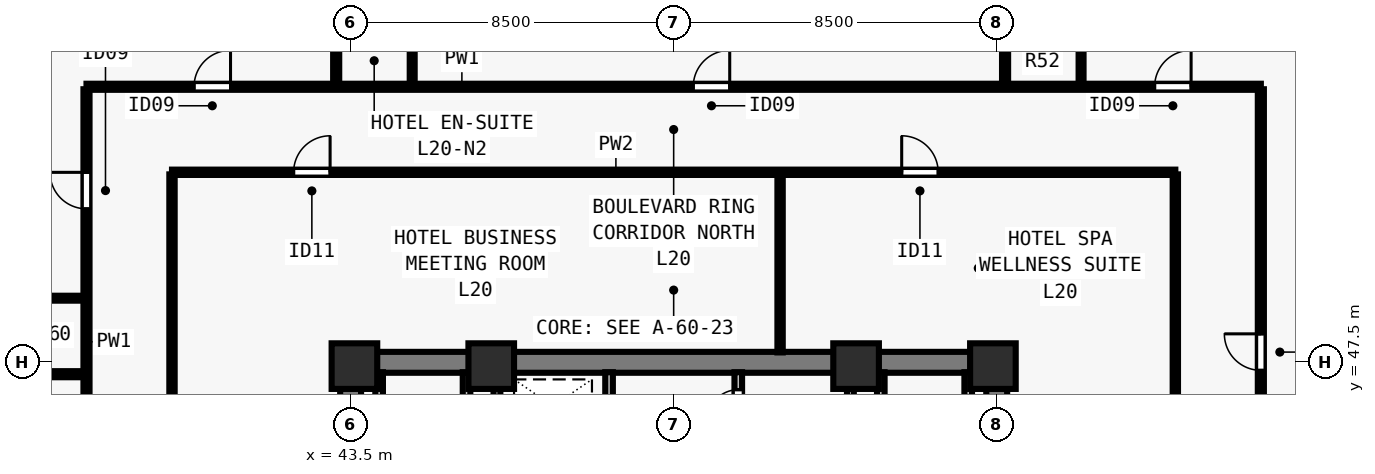
"""IFC4 building model, lengths in metres.
Left out: names, types, materials, properties, quantities, classifications, styles, units other than length and angle.
Written with IfcOpenShell. Run it as: python <this file> out.ifc"""

import sys

from ifc_helpers import new_model, si_unit, direction, frame, frame_2d, origin, origin_2d, place, context, subcontext, project, spatial, rectangle, extrude, element, fill, save


model = new_model("IFC4")
c1 = context("Model", 3, precision=1e-05, world=origin(), true_north=direction((0.0, 1.0)))
c2 = subcontext(c1, "Body", "Model", "MODEL_VIEW")
j1 = project(units=[si_unit("LENGTHUNIT", "METRE"), si_unit("PLANEANGLEUNIT", "RADIAN")], contexts=[c1])
p1 = place(None, origin())
s1 = spatial("IfcSite", under=j1, at=p1, CompositionType="ELEMENT")
p2 = place(p1, origin())
s2 = spatial("IfcBuilding", under=s1, at=p2, CompositionType="ELEMENT")
p3 = place(p2, frame((0.0, 0.0, 76.0)))
s3 = spatial("IfcBuildingStorey", under=s2, at=p3, CompositionType="ELEMENT", Elevation=76.0)
for number, where, z_axis, x_axis in (
    (1, (43.6, 47.4, 0.0), (0.0, 0.0, 1.0), (1.0, 0.0, 0.0)),
    (2, (47.2, 47.4, 0.0), (0.0, 0.0, 1.0), (1.0, 0.0, 0.0)),
    (3, (56.8, 47.4, 0.0), (0.0, 0.0, 1.0), (1.0, 0.0, 0.0)),
    (4, (60.4, 47.4, 0.0), (0.0, 0.0, 1.0), (1.0, 0.0, 0.0)),
):
    element("IfcColumn", number, at=place(p3, frame(where, z_axis=z_axis, x_axis=x_axis)), inside=s3, PredefinedType="COLUMN", context=c2, shape_type="SweptSolid", body=[
        extrude(rectangle(XDim=1.2, YDim=1.2, at=origin_2d()), origin(), (0.0, 0.0, 1.0), 3.5),
    ])
p4 = place(p3, frame((43.225, 47.5, 0.0), z_axis=(0.0, 0.0, 1.0), x_axis=(1.0, 0.0, 0.0)))
e5 = element("IfcWall", 5, at=p4, inside=s3, PredefinedType="SHEAR", context=c2, shape_type="SweptSolid", body=[
    extrude(rectangle(XDim=17.55, YDim=0.55, at=frame_2d((8.775, 0.0))), origin(), (0.0, 0.0, 1.0), 3.28),
])
for number, where, z_axis, x_axis in (
    (6, (43.5, 40.8, 0.0), (0.0, 0.0, 1.0), (0.0, 1.0, 0.0)),
    (7, (60.5, 40.8, 0.0), (0.0, 0.0, 1.0), (0.0, 1.0, 0.0)),
):
    element("IfcWall", number, at=place(p3, frame(where, z_axis=z_axis, x_axis=x_axis)), inside=s3, PredefinedType="SHEAR", context=c2, shape_type="SweptSolid", body=[
        extrude(rectangle(XDim=6.435, YDim=0.55, at=frame_2d((3.218, 0.0))), origin(), (0.0, 0.0, 1.0), 3.28),
    ])
p5 = place(p3, frame((50.3, 40.585, 0.0), z_axis=(0.0, 0.0, 1.0), x_axis=(0.0, 1.0, 0.0)))
e8 = element("IfcWall", 8, at=p5, inside=s3, PredefinedType="SOLIDWALL", context=c2, shape_type="SweptSolid", body=[
    extrude(rectangle(XDim=6.655, YDim=0.2, at=frame_2d((3.328, 0.0))), origin(), (0.0, 0.0, 1.0), 3.28),
])
p6 = place(p5, frame((5.065, 0.0, 0.0)))
e9 = element("IfcOpeningElement", 9, at=p6, cuts=e8, PredefinedType="OPENING", context=c2, shape_type="SweptSolid", body=[
    extrude(rectangle(XDim=0.8, YDim=2.08, at=frame_2d((0.4, 1.04))), frame((0.0, 0.11, 0.0), z_axis=(0.0, -1.0, 0.0), x_axis=(1.0, 0.0, 0.0)), (0.0, 0.0, 1.0), 0.22),
])
p7 = place(p3, frame((53.7, 40.585, 0.0), z_axis=(0.0, 0.0, 1.0), x_axis=(0.0, 1.0, 0.0)))
e10 = element("IfcWall", 10, at=p7, inside=s3, PredefinedType="SOLIDWALL", context=c2, shape_type="SweptSolid", body=[
    extrude(rectangle(XDim=6.655, YDim=0.2, at=frame_2d((3.328, 0.0))), origin(), (0.0, 0.0, 1.0), 3.28),
])
p8 = place(p7, frame((0.195, 0.0, 0.0)))
e11 = element("IfcOpeningElement", 11, at=p8, cuts=e10, PredefinedType="OPENING", context=c2, shape_type="SweptSolid", body=[
    extrude(rectangle(XDim=0.8, YDim=2.08, at=frame_2d((0.4, 1.04))), frame((0.0, 0.11, 0.0), z_axis=(0.0, -1.0, 0.0), x_axis=(1.0, 0.0, 0.0)), (0.0, 0.0, 1.0), 0.22),
])
p9 = place(p7, frame((3.735, 0.0, 0.0)))
e12 = element("IfcOpeningElement", 12, at=p9, cuts=e10, PredefinedType="OPENING", context=c2, shape_type="SweptSolid", body=[
    extrude(rectangle(XDim=0.9, YDim=2.12, at=frame_2d((0.45, 1.06))), frame((0.0, 0.11, 0.0), z_axis=(0.0, -1.0, 0.0), x_axis=(1.0, 0.0, 0.0)), (0.0, 0.0, 1.0), 0.22),
])
p10 = place(p7, frame((5.395, 0.0, 0.0)))
e13 = element("IfcOpeningElement", 13, at=p10, cuts=e10, PredefinedType="OPENING", context=c2, shape_type="SweptSolid", body=[
    extrude(rectangle(XDim=0.8, YDim=2.1, at=frame_2d((0.4, 1.05))), frame((0.0, 0.11, 0.0), z_axis=(0.0, -1.0, 0.0), x_axis=(1.0, 0.0, 0.0)), (0.0, 0.0, 1.0), 0.22),
])
for number, where, z_axis, x_axis in (
    (14, (46.55, 43.735, 0.0), (0.0, 0.0, 1.0), (0.0, 1.0, 0.0)),
    (15, (44.25, 43.735, 0.0), (0.0, 0.0, 1.0), (0.0, 1.0, 0.0)),
    (16, (57.45, 43.735, 0.0), (0.0, 0.0, 1.0), (0.0, 1.0, 0.0)),
    (17, (59.75, 43.735, 0.0), (0.0, 0.0, 1.0), (0.0, 1.0, 0.0)),
):
    element("IfcWall", number, at=place(p3, frame(where, z_axis=z_axis, x_axis=x_axis)), inside=s3, PredefinedType="SOLIDWALL", context=c2, shape_type="SweptSolid", body=[
        extrude(rectangle(XDim=3.505, YDim=0.2, at=frame_2d((1.752, 0.0))), origin(), (0.0, 0.0, 1.0), 3.28),
    ])
for number, where, z_axis, x_axis in (
    (18, (47.35, 43.735, 0.0), (0.0, 0.0, 1.0), (0.0, 1.0, 0.0)),
    (19, (56.65, 43.735, 0.0), (0.0, 0.0, 1.0), (0.0, 1.0, 0.0)),
):
    element("IfcWall", number, at=place(p3, frame(where, z_axis=z_axis, x_axis=x_axis)), inside=s3, PredefinedType="SOLIDWALL", context=c2, shape_type="SweptSolid", body=[
        extrude(rectangle(XDim=3.505, YDim=0.18, at=frame_2d((1.752, 0.0))), origin(), (0.0, 0.0, 1.0), 3.28),
    ])
p11 = place(p3, frame((36.55, 54.75, 0.0), z_axis=(0.0, 0.0, 1.0), x_axis=(1.0, 0.0, 0.0)))
e20 = element("IfcWall", 20, at=p11, inside=s3, PredefinedType="PARTITIONING", context=c2, shape_type="SweptSolid", body=[
    extrude(rectangle(XDim=30.9, YDim=0.16, at=frame_2d((15.45, 0.0))), origin(), (0.0, 0.0, 1.0), 3.28),
])
p12 = place(p11, frame((2.83, 0.0, 0.0)))
e21 = element("IfcOpeningElement", 21, at=p12, cuts=e20, PredefinedType="OPENING", context=c2, shape_type="SweptSolid", body=[
    extrude(rectangle(XDim=0.96, YDim=2.15, at=frame_2d((0.48, 1.075))), frame((0.0, 0.09, 0.0), z_axis=(0.0, -1.0, 0.0), x_axis=(1.0, 0.0, 0.0)), (0.0, 0.0, 1.0), 0.18),
])
p13 = place(p11, frame((15.965, 0.0, 0.0)))
e22 = element("IfcOpeningElement", 22, at=p13, cuts=e20, PredefinedType="OPENING", context=c2, shape_type="SweptSolid", body=[
    extrude(rectangle(XDim=0.96, YDim=2.15, at=frame_2d((0.48, 1.075))), frame((0.0, 0.09, 0.0), z_axis=(0.0, -1.0, 0.0), x_axis=(1.0, 0.0, 0.0)), (0.0, 0.0, 1.0), 0.18),
])
p14 = place(p11, frame((28.105, 0.0, 0.0)))
e23 = element("IfcOpeningElement", 23, at=p14, cuts=e20, PredefinedType="OPENING", context=c2, shape_type="SweptSolid", body=[
    extrude(rectangle(XDim=0.96, YDim=2.15, at=frame_2d((0.48, 1.075))), frame((0.0, 0.09, 0.0), z_axis=(0.0, -1.0, 0.0), x_axis=(1.0, 0.0, 0.0)), (0.0, 0.0, 1.0), 0.18),
])
p15 = place(p3, frame((36.55, 23.315, 0.0), z_axis=(0.0, 0.0, 1.0), x_axis=(0.0, 1.0, 0.0)))
e24 = element("IfcWall", 24, at=p15, inside=s3, PredefinedType="PARTITIONING", context=c2, shape_type="SweptSolid", body=[
    extrude(rectangle(XDim=31.37, YDim=0.16, at=frame_2d((15.685, 0.0))), origin(), (0.0, 0.0, 1.0), 3.28),
])
p16 = place(p15, frame((4.848, 0.0, 0.0)))
e25 = element("IfcOpeningElement", 25, at=p16, cuts=e24, PredefinedType="OPENING", context=c2, shape_type="SweptSolid", body=[
    extrude(rectangle(XDim=0.96, YDim=2.15, at=frame_2d((0.48, 1.075))), frame((0.0, 0.09, 0.0), z_axis=(0.0, -1.0, 0.0), x_axis=(1.0, 0.0, 0.0)), (0.0, 0.0, 1.0), 0.18),
])
p17 = place(p15, frame((12.39, 0.0, 0.0)))
e26 = element("IfcOpeningElement", 26, at=p17, cuts=e24, PredefinedType="OPENING", context=c2, shape_type="SweptSolid", body=[
    extrude(rectangle(XDim=0.96, YDim=2.15, at=frame_2d((0.48, 1.075))), frame((0.0, 0.09, 0.0), z_axis=(0.0, -1.0, 0.0), x_axis=(1.0, 0.0, 0.0)), (0.0, 0.0, 1.0), 0.18),
])
p18 = place(p15, frame((20.265, 0.0, 0.0)))
e27 = element("IfcOpeningElement", 27, at=p18, cuts=e24, PredefinedType="OPENING", context=c2, shape_type="SweptSolid", body=[
    extrude(rectangle(XDim=0.96, YDim=2.15, at=frame_2d((0.48, 1.075))), frame((0.0, 0.09, 0.0), z_axis=(0.0, -1.0, 0.0), x_axis=(1.0, 0.0, 0.0)), (0.0, 0.0, 1.0), 0.18),
])
p19 = place(p15, frame((28.223, 0.0, 0.0)))
e28 = element("IfcOpeningElement", 28, at=p19, cuts=e24, PredefinedType="OPENING", context=c2, shape_type="SweptSolid", body=[
    extrude(rectangle(XDim=0.96, YDim=2.15, at=frame_2d((0.48, 1.075))), frame((0.0, 0.09, 0.0), z_axis=(0.0, -1.0, 0.0), x_axis=(1.0, 0.0, 0.0)), (0.0, 0.0, 1.0), 0.18),
])
p20 = place(p3, frame((67.45, 23.315, 0.0), z_axis=(0.0, 0.0, 1.0), x_axis=(0.0, 1.0, 0.0)))
e29 = element("IfcWall", 29, at=p20, inside=s3, PredefinedType="PARTITIONING", context=c2, shape_type="SweptSolid", body=[
    extrude(rectangle(XDim=31.37, YDim=0.16, at=frame_2d((15.685, 0.0))), origin(), (0.0, 0.0, 1.0), 3.28),
])
p21 = place(p20, frame((8.474, 0.0, 0.0)))
e30 = element("IfcOpeningElement", 30, at=p21, cuts=e29, PredefinedType="OPENING", context=c2, shape_type="SweptSolid", body=[
    extrude(rectangle(XDim=0.96, YDim=2.15, at=frame_2d((0.48, 1.075))), frame((0.0, 0.09, 0.0), z_axis=(0.0, -1.0, 0.0), x_axis=(1.0, 0.0, 0.0)), (0.0, 0.0, 1.0), 0.18),
])
p22 = place(p20, frame((23.974, 0.0, 0.0)))
e31 = element("IfcOpeningElement", 31, at=p22, cuts=e29, PredefinedType="OPENING", context=c2, shape_type="SweptSolid", body=[
    extrude(rectangle(XDim=0.96, YDim=2.15, at=frame_2d((0.48, 1.075))), frame((0.0, 0.09, 0.0), z_axis=(0.0, -1.0, 0.0), x_axis=(1.0, 0.0, 0.0)), (0.0, 0.0, 1.0), 0.18),
])
p23 = place(p3, frame((38.8, 52.5, 0.0), z_axis=(0.0, 0.0, 1.0), x_axis=(1.0, 0.0, 0.0)))
e32 = element("IfcWall", 32, at=p23, inside=s3, PredefinedType="PARTITIONING", context=c2, shape_type="SweptSolid", body=[
    extrude(rectangle(XDim=26.4, YDim=0.14, at=frame_2d((13.2, 0.0))), origin(), (0.0, 0.0, 1.0), 3.28),
])
p24 = place(p23, frame((3.2, 0.0, 0.0)))
e33 = element("IfcOpeningElement", 33, at=p24, cuts=e32, PredefinedType="OPENING", context=c2, shape_type="SweptSolid", body=[
    extrude(rectangle(XDim=0.96, YDim=2.12, at=frame_2d((0.48, 1.06))), frame((0.0, 0.08, 0.0), z_axis=(0.0, -1.0, 0.0), x_axis=(1.0, 0.0, 0.0)), (0.0, 0.0, 1.0), 0.16),
])
p25 = place(p23, frame((19.2, 0.0, 0.0)))
e34 = element("IfcOpeningElement", 34, at=p25, cuts=e32, PredefinedType="OPENING", context=c2, shape_type="SweptSolid", body=[
    extrude(rectangle(XDim=0.96, YDim=2.12, at=frame_2d((0.48, 1.06))), frame((0.0, 0.08, 0.0), z_axis=(0.0, -1.0, 0.0), x_axis=(1.0, 0.0, 0.0)), (0.0, 0.0, 1.0), 0.16),
])
p26 = place(p3, frame((38.8, 40.8, 0.0), z_axis=(0.0, 0.0, 1.0), x_axis=(0.0, 1.0, 0.0)))
e35 = element("IfcWall", 35, at=p26, inside=s3, PredefinedType="PARTITIONING", context=c2, shape_type="SweptSolid", body=[
    extrude(rectangle(XDim=11.645, YDim=0.14, at=frame_2d((5.823, 0.0))), origin(), (0.0, 0.0, 1.0), 3.28),
])
p27 = place(p26, frame((2.5, 0.0, 0.0)))
e36 = element("IfcOpeningElement", 36, at=p27, cuts=e35, PredefinedType="OPENING", context=c2, shape_type="SweptSolid", body=[
    extrude(rectangle(XDim=0.88, YDim=2.1, at=frame_2d((0.44, 1.05))), frame((0.0, 0.08, 0.0), z_axis=(0.0, -1.0, 0.0), x_axis=(1.0, 0.0, 0.0)), (0.0, 0.0, 1.0), 0.16),
])
p28 = place(p3, frame((65.2, 40.8, 0.0), z_axis=(0.0, 0.0, 1.0), x_axis=(0.0, 1.0, 0.0)))
e37 = element("IfcWall", 37, at=p28, inside=s3, PredefinedType="PARTITIONING", context=c2, shape_type="SweptSolid", body=[
    extrude(rectangle(XDim=11.645, YDim=0.14, at=frame_2d((5.823, 0.0))), origin(), (0.0, 0.0, 1.0), 3.28),
])
p29 = place(p28, frame((2.5, 0.0, 0.0)))
e38 = element("IfcOpeningElement", 38, at=p29, cuts=e37, PredefinedType="OPENING", context=c2, shape_type="SweptSolid", body=[
    extrude(rectangle(XDim=0.88, YDim=2.1, at=frame_2d((0.44, 1.05))), frame((0.0, 0.08, 0.0), z_axis=(0.0, -1.0, 0.0), x_axis=(1.0, 0.0, 0.0)), (0.0, 0.0, 1.0), 0.16),
])
p30 = place(p3, frame((54.8, 47.76, 0.0), z_axis=(0.0, 0.0, 1.0), x_axis=(0.0, 1.0, 0.0)))
e39 = element("IfcWall", 39, at=p30, inside=s3, PredefinedType="PARTITIONING", context=c2, shape_type="SweptSolid", body=[
    extrude(rectangle(XDim=4.685, YDim=0.14, at=frame_2d((2.343, 0.0))), origin(), (0.0, 0.0, 1.0), 3.28),
])
p31 = place(p3, frame((43.12, 54.815, 0.0), z_axis=(0.0, 0.0, 1.0), x_axis=(0.0, 1.0, 0.0)))
e40 = element("IfcWall", 40, at=p31, inside=s3, PredefinedType="PARTITIONING", context=c2, shape_type="SweptSolid", body=[
    extrude(rectangle(XDim=9.34, YDim=0.16, at=frame_2d((4.67, 0.0))), origin(), (0.0, 0.0, 1.0), 3.28),
])
p32 = place(p3, frame((45.12, 54.815, 0.0), z_axis=(0.0, 0.0, 1.0), x_axis=(0.0, 1.0, 0.0)))
e41 = element("IfcWall", 41, at=p32, inside=s3, PredefinedType="PLUMBINGWALL", context=c2, shape_type="SweptSolid", body=[
    extrude(rectangle(XDim=2.235, YDim=0.13, at=frame_2d((1.118, 0.0))), origin(), (0.0, 0.0, 1.0), 3.28),
])
p33 = place(p3, frame((60.72, 54.815, 0.0), z_axis=(0.0, 0.0, 1.0), x_axis=(0.0, 1.0, 0.0)))
e42 = element("IfcWall", 42, at=p33, inside=s3, PredefinedType="PARTITIONING", context=c2, shape_type="SweptSolid", body=[
    extrude(rectangle(XDim=9.34, YDim=0.16, at=frame_2d((4.67, 0.0))), origin(), (0.0, 0.0, 1.0), 3.28),
])
p34 = place(p3, frame((62.72, 54.815, 0.0), z_axis=(0.0, 0.0, 1.0), x_axis=(0.0, 1.0, 0.0)))
e43 = element("IfcWall", 43, at=p34, inside=s3, PredefinedType="PLUMBINGWALL", context=c2, shape_type="SweptSolid", body=[
    extrude(rectangle(XDim=2.235, YDim=0.13, at=frame_2d((1.118, 0.0))), origin(), (0.0, 0.0, 1.0), 3.28),
])
p35 = place(p3, frame((26.845, 47.187, 0.0), z_axis=(0.0, 0.0, 1.0), x_axis=(1.0, 0.0, 0.0)))
e44 = element("IfcWall", 44, at=p35, inside=s3, PredefinedType="PARTITIONING", context=c2, shape_type="SweptSolid", body=[
    extrude(rectangle(XDim=9.64, YDim=0.16, at=frame_2d((4.82, 0.0))), origin(), (0.0, 0.0, 1.0), 3.28),
])
p36 = place(p3, frame((34.25, 49.187, 0.0), z_axis=(0.0, 0.0, 1.0), x_axis=(1.0, 0.0, 0.0)))
e45 = element("IfcWall", 45, at=p36, inside=s3, PredefinedType="PLUMBINGWALL", context=c2, shape_type="SweptSolid", body=[
    extrude(rectangle(XDim=2.235, YDim=0.13, at=frame_2d((1.118, 0.0))), origin(), (0.0, 0.0, 1.0), 3.28),
])
p37 = place(p10, origin())
e46 = element("IfcDoor", 46, at=p37, inside=s3, OperationType="SINGLE_SWING_LEFT", PredefinedType="DOOR", context=c2, shape_type="SweptSolid", body=[
    extrude(rectangle(XDim=0.8, YDim=2.1, at=frame_2d((0.4, 1.05))), frame((0.0, 0.025, 0.0), z_axis=(0.0, -1.0, 0.0), x_axis=(1.0, 0.0, 0.0)), (0.0, 0.0, 1.0), 0.05),
])
fill(e13, e46)
p38 = place(p24, origin())
e47 = element("IfcDoor", 47, at=p38, inside=s3, OperationType="SINGLE_SWING_RIGHT", PredefinedType="DOOR", context=c2, shape_type="SweptSolid", body=[
    extrude(rectangle(XDim=0.96, YDim=2.12, at=frame_2d((0.48, 1.06))), frame((0.0, 0.025, 0.0), z_axis=(0.0, -1.0, 0.0), x_axis=(1.0, 0.0, 0.0)), (0.0, 0.0, 1.0), 0.05),
])
fill(e33, e47)
p39 = place(p25, origin())
e48 = element("IfcDoor", 48, at=p39, inside=s3, OperationType="SINGLE_SWING_LEFT", PredefinedType="DOOR", context=c2, shape_type="SweptSolid", body=[
    extrude(rectangle(XDim=0.96, YDim=2.12, at=frame_2d((0.48, 1.06))), frame((0.0, 0.025, 0.0), z_axis=(0.0, -1.0, 0.0), x_axis=(1.0, 0.0, 0.0)), (0.0, 0.0, 1.0), 0.05),
])
fill(e34, e48)
p40 = place(p12, origin())
e49 = element("IfcDoor", 49, at=p40, inside=s3, OperationType="SINGLE_SWING_RIGHT", PredefinedType="DOOR", context=c2, shape_type="SweptSolid", body=[
    extrude(rectangle(XDim=0.96, YDim=2.15, at=frame_2d((0.48, 1.075))), frame((0.0, 0.025, 0.0), z_axis=(0.0, -1.0, 0.0), x_axis=(1.0, 0.0, 0.0)), (0.0, 0.0, 1.0), 0.05),
])
fill(e21, e49)
p41 = place(p13, origin())
e50 = element("IfcDoor", 50, at=p41, inside=s3, OperationType="SINGLE_SWING_RIGHT", PredefinedType="DOOR", context=c2, shape_type="SweptSolid", body=[
    extrude(rectangle(XDim=0.96, YDim=2.15, at=frame_2d((0.48, 1.075))), frame((0.0, 0.025, 0.0), z_axis=(0.0, -1.0, 0.0), x_axis=(1.0, 0.0, 0.0)), (0.0, 0.0, 1.0), 0.05),
])
fill(e22, e50)
p42 = place(p14, origin())
e51 = element("IfcDoor", 51, at=p42, inside=s3, OperationType="SINGLE_SWING_RIGHT", PredefinedType="DOOR", context=c2, shape_type="SweptSolid", body=[
    extrude(rectangle(XDim=0.96, YDim=2.15, at=frame_2d((0.48, 1.075))), frame((0.0, 0.025, 0.0), z_axis=(0.0, -1.0, 0.0), x_axis=(1.0, 0.0, 0.0)), (0.0, 0.0, 1.0), 0.05),
])
fill(e23, e51)
p43 = place(p19, origin())
e52 = element("IfcDoor", 52, at=p43, inside=s3, OperationType="SINGLE_SWING_RIGHT", PredefinedType="DOOR", context=c2, shape_type="SweptSolid", body=[
    extrude(rectangle(XDim=0.96, YDim=2.15, at=frame_2d((0.48, 1.075))), frame((0.0, 0.025, 0.0), z_axis=(0.0, -1.0, 0.0), x_axis=(1.0, 0.0, 0.0)), (0.0, 0.0, 1.0), 0.05),
])
fill(e28, e52)
p44 = place(p22, origin())
e53 = element("IfcDoor", 53, at=p44, inside=s3, OperationType="SINGLE_SWING_RIGHT", PredefinedType="DOOR", context=c2, shape_type="SweptSolid", body=[
    extrude(rectangle(XDim=0.96, YDim=2.15, at=frame_2d((0.48, 1.075))), frame((0.0, 0.025, 0.0), z_axis=(0.0, -1.0, 0.0), x_axis=(1.0, 0.0, 0.0)), (0.0, 0.0, 1.0), 0.05),
])
fill(e31, e53)
save(model, sys.argv[1])
